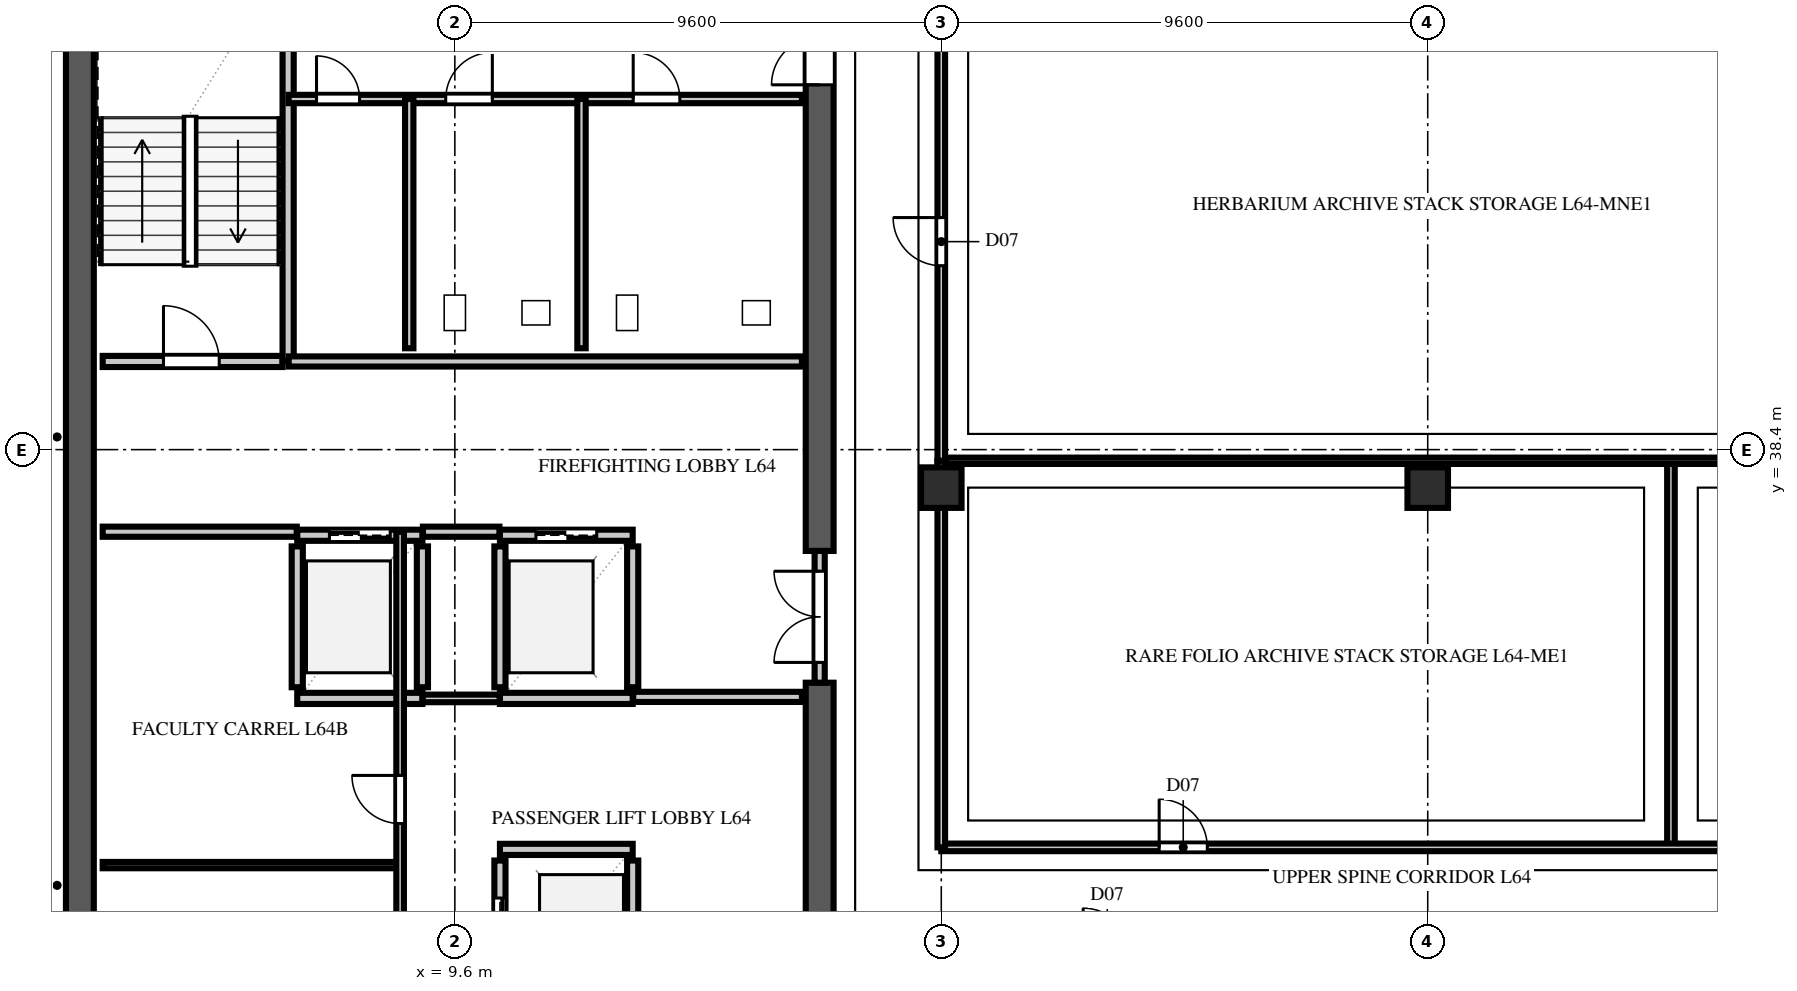
"""IFC4 building model, lengths in metres.
Left out: names, types, materials, properties, quantities, classifications, styles, units other than length and angle.
Written with IfcOpenShell. Run it as: python <this file> out.ifc"""

import sys

from ifc_helpers import new_model, si_unit, direction, frame, frame_2d, origin, origin_2d, place, context, subcontext, project, spatial, rectangle, extrude, element, fill, save


model = new_model("IFC4")
c1 = context("Model", 3, precision=1e-05, world=origin(), true_north=direction((0.0, 1.0)))
c2 = subcontext(c1, "Body", "Model", "MODEL_VIEW")
j1 = project(units=[si_unit("LENGTHUNIT", "METRE"), si_unit("PLANEANGLEUNIT", "RADIAN")], contexts=[c1])
p1 = place(None, origin())
s1 = spatial("IfcSite", under=j1, at=p1, CompositionType="ELEMENT")
p2 = place(p1, origin())
s2 = spatial("IfcBuilding", under=s1, at=p2, CompositionType="ELEMENT")
p3 = place(p2, frame((0.0, 0.0, 252.2)))
s3 = spatial("IfcBuildingStorey", under=s2, at=p3, CompositionType="ELEMENT", Elevation=252.2)
p4 = place(p3, frame((2.2, 9.325, 0.0), z_axis=(0.0, 0.0, 1.0), x_axis=(0.0, 1.0, 0.0)))
e1 = element("IfcWall", 1, at=p4, inside=s3, PredefinedType="SHEAR", context=c2, shape_type="SweptSolid", body=[
    extrude(rectangle(XDim=38.95, YDim=0.55, at=frame_2d((19.475, 0.0))), origin(), (0.0, 0.0, 1.0), 3.48),
])
p5 = place(p3, frame((16.8, 26.0, 0.0), z_axis=(0.0, 0.0, 1.0), x_axis=(0.0, 1.0, 0.0)))
e2 = element("IfcWall", 2, at=p5, inside=s3, PredefinedType="SHEAR", context=c2, shape_type="SweptSolid", body=[
    extrude(rectangle(XDim=7.8, YDim=0.55, at=frame_2d((3.9, 0.0))), origin(), (0.0, 0.0, 1.0), 3.48),
])
p6 = place(p3, frame((16.8, 36.4, 0.0), z_axis=(0.0, 0.0, 1.0), x_axis=(0.0, 1.0, 0.0)))
e3 = element("IfcWall", 3, at=p6, inside=s3, PredefinedType="SHEAR", context=c2, shape_type="SweptSolid", body=[
    extrude(rectangle(XDim=11.325, YDim=0.55, at=frame_2d((5.663, 0.0))), origin(), (0.0, 0.0, 1.0), 3.48),
])
p7 = place(p6, frame((9.2, 0.0, 0.0)))
e4 = element("IfcOpeningElement", 4, at=p7, cuts=e3, PredefinedType="OPENING", context=c2, shape_type="SweptSolid", body=[
    extrude(rectangle(XDim=0.95, YDim=2.15, at=frame_2d((0.475, 1.075))), frame((0.0, 0.287, 0.0), z_axis=(0.0, -1.0, 0.0), x_axis=(1.0, 0.0, 0.0)), (0.0, 0.0, 1.0), 0.574),
])
for number, where, z_axis, x_axis in (
    (5, (19.2, 37.65, 0.0), (0.0, 0.0, 1.0), (1.0, 0.0, 0.0)),
    (6, (28.8, 37.65, 0.0), (0.0, 0.0, 1.0), (1.0, 0.0, 0.0)),
):
    element("IfcColumn", number, at=place(p3, frame(where, z_axis=z_axis, x_axis=x_axis)), inside=s3, PredefinedType="COLUMN", context=c2, shape_type="SweptSolid", body=[
        extrude(rectangle(XDim=0.8, YDim=0.8, at=origin_2d()), origin(), (0.0, 0.0, 1.0), 3.8),
    ])
p8 = place(p3, frame((2.65, 40.14, 0.0), z_axis=(0.0, 0.0, 1.0), x_axis=(1.0, 0.0, 0.0)))
e7 = element("IfcWall", 7, at=p8, inside=s3, PredefinedType="SOLIDWALL", context=c2, shape_type="SweptSolid", body=[
    extrude(rectangle(XDim=3.55, YDim=0.22, at=frame_2d((1.775, 0.0))), origin(), (0.0, 0.0, 1.0), 3.48),
])
p9 = place(p8, frame((1.2, 0.0, 0.0)))
e8 = element("IfcOpeningElement", 8, at=p9, cuts=e7, PredefinedType="OPENING", context=c2, shape_type="SweptSolid", body=[
    extrude(rectangle(XDim=1.1, YDim=2.2, at=frame_2d((0.55, 1.1))), frame((0.0, 0.122, 0.0), z_axis=(0.0, -1.0, 0.0), x_axis=(1.0, 0.0, 0.0)), (0.0, 0.0, 1.0), 0.244),
])
p10 = place(p3, frame((6.31, 40.14, 0.0), z_axis=(0.0, 0.0, 1.0), x_axis=(0.0, 1.0, 0.0)))
e9 = element("IfcWall", 9, at=p10, inside=s3, PredefinedType="SOLIDWALL", context=c2, shape_type="SweptSolid", body=[
    extrude(rectangle(XDim=7.81, YDim=0.22, at=frame_2d((3.905, 0.0))), origin(), (0.0, 0.0, 1.0), 3.48),
])
p11 = place(p3, frame((10.49, 27.71, 0.0), z_axis=(0.0, 0.0, 1.0), x_axis=(0.0, 1.0, 0.0)))
e10 = element("IfcWall", 10, at=p11, inside=s3, PredefinedType="SOLIDWALL", context=c2, shape_type="SweptSolid", body=[
    extrude(rectangle(XDim=2.58, YDim=0.22, at=frame_2d((1.29, 0.0))), origin(), (0.0, 0.0, 1.0), 3.48),
])
p12 = place(p11, frame((0.74, 0.0, 0.0)))
e11 = element("IfcOpeningElement", 11, at=p12, cuts=e10, PredefinedType="OPENING", context=c2, shape_type="SweptSolid", body=[
    extrude(rectangle(XDim=1.1, YDim=2.2, at=frame_2d((0.55, 1.1))), frame((0.0, 0.122, 0.0), z_axis=(0.0, -1.0, 0.0), x_axis=(1.0, 0.0, 0.0)), (0.0, 0.0, 1.0), 0.244),
])
p13 = place(p3, frame((13.11, 27.71, 0.0), z_axis=(0.0, 0.0, 1.0), x_axis=(0.0, 1.0, 0.0)))
e12 = element("IfcWall", 12, at=p13, inside=s3, PredefinedType="SOLIDWALL", context=c2, shape_type="SweptSolid", body=[
    extrude(rectangle(XDim=2.58, YDim=0.22, at=frame_2d((1.29, 0.0))), origin(), (0.0, 0.0, 1.0), 3.48),
])
p14 = place(p3, frame((10.49, 30.51, 0.0), z_axis=(0.0, 0.0, 1.0), x_axis=(1.0, 0.0, 0.0)))
e13 = element("IfcWall", 13, at=p14, inside=s3, PredefinedType="SOLIDWALL", context=c2, shape_type="SweptSolid", body=[
    extrude(rectangle(XDim=2.62, YDim=0.22, at=frame_2d((1.31, 0.0))), origin(), (0.0, 0.0, 1.0), 3.48),
])
for number, where, z_axis, x_axis in (
    (14, (6.49, 33.71, 0.0), (0.0, 0.0, 1.0), (0.0, 1.0, 0.0)),
    (15, (8.96, 33.71, 0.0), (0.0, 0.0, 1.0), (0.0, 1.0, 0.0)),
):
    element("IfcWall", number, at=place(p3, frame(where, z_axis=z_axis, x_axis=x_axis)), inside=s3, PredefinedType="SOLIDWALL", context=c2, shape_type="SweptSolid", body=[
        extrude(rectangle(XDim=2.78, YDim=0.22, at=frame_2d((1.39, 0.0))), origin(), (0.0, 0.0, 1.0), 3.48),
    ])
p15 = place(p3, frame((6.49, 33.49, 0.0), z_axis=(0.0, 0.0, 1.0), x_axis=(1.0, 0.0, 0.0)))
e16 = element("IfcWall", 16, at=p15, inside=s3, PredefinedType="SOLIDWALL", context=c2, shape_type="SweptSolid", body=[
    extrude(rectangle(XDim=2.47, YDim=0.22, at=frame_2d((1.235, 0.0))), origin(), (0.0, 0.0, 1.0), 3.48),
])
p16 = place(p3, frame((6.49, 36.71, 0.0), z_axis=(0.0, 0.0, 1.0), x_axis=(1.0, 0.0, 0.0)))
e17 = element("IfcWall", 17, at=p16, inside=s3, PredefinedType="SOLIDWALL", context=c2, shape_type="SweptSolid", body=[
    extrude(rectangle(XDim=2.47, YDim=0.22, at=frame_2d((1.235, 0.0))), origin(), (0.0, 0.0, 1.0), 3.48),
])
p17 = place(p16, frame((0.635, 0.0, 0.0)))
e18 = element("IfcOpeningElement", 18, at=p17, cuts=e17, PredefinedType="OPENING", context=c2, shape_type="SweptSolid", body=[
    extrude(rectangle(XDim=1.2, YDim=2.2, at=frame_2d((0.6, 1.1))), frame((0.0, 0.122, 0.0), z_axis=(0.0, -1.0, 0.0), x_axis=(1.0, 0.0, 0.0)), (0.0, 0.0, 1.0), 0.244),
])
for number, where, z_axis, x_axis in (
    (19, (10.49, 33.71, 0.0), (0.0, 0.0, 1.0), (0.0, 1.0, 0.0)),
    (20, (13.11, 33.71, 0.0), (0.0, 0.0, 1.0), (0.0, 1.0, 0.0)),
):
    element("IfcWall", number, at=place(p3, frame(where, z_axis=z_axis, x_axis=x_axis)), inside=s3, PredefinedType="SOLIDWALL", context=c2, shape_type="SweptSolid", body=[
        extrude(rectangle(XDim=2.78, YDim=0.22, at=frame_2d((1.39, 0.0))), origin(), (0.0, 0.0, 1.0), 3.48),
    ])
p18 = place(p3, frame((10.49, 33.49, 0.0), z_axis=(0.0, 0.0, 1.0), x_axis=(1.0, 0.0, 0.0)))
e21 = element("IfcWall", 21, at=p18, inside=s3, PredefinedType="SOLIDWALL", context=c2, shape_type="SweptSolid", body=[
    extrude(rectangle(XDim=2.62, YDim=0.22, at=frame_2d((1.31, 0.0))), origin(), (0.0, 0.0, 1.0), 3.48),
])
p19 = place(p3, frame((10.49, 36.71, 0.0), z_axis=(0.0, 0.0, 1.0), x_axis=(1.0, 0.0, 0.0)))
e22 = element("IfcWall", 22, at=p19, inside=s3, PredefinedType="SOLIDWALL", context=c2, shape_type="SweptSolid", body=[
    extrude(rectangle(XDim=2.62, YDim=0.22, at=frame_2d((1.31, 0.0))), origin(), (0.0, 0.0, 1.0), 3.48),
])
p20 = place(p19, frame((0.71, 0.0, 0.0)))
e23 = element("IfcOpeningElement", 23, at=p20, cuts=e22, PredefinedType="OPENING", context=c2, shape_type="SweptSolid", body=[
    extrude(rectangle(XDim=1.2, YDim=2.2, at=frame_2d((0.6, 1.1))), frame((0.0, 0.122, 0.0), z_axis=(0.0, -1.0, 0.0), x_axis=(1.0, 0.0, 0.0)), (0.0, 0.0, 1.0), 0.244),
])
p21 = place(p3, frame((2.65, 36.78, 0.0), z_axis=(0.0, 0.0, 1.0), x_axis=(1.0, 0.0, 0.0)))
e24 = element("IfcWall", 24, at=p21, inside=s3, PredefinedType="SOLIDWALL", context=c2, shape_type="SweptSolid", body=[
    extrude(rectangle(XDim=3.83, YDim=0.2, at=frame_2d((1.915, 0.0))), origin(), (0.0, 0.0, 1.0), 3.48),
])
p22 = place(p3, frame((8.97, 36.78, 0.0), z_axis=(0.0, 0.0, 1.0), x_axis=(1.0, 0.0, 0.0)))
e25 = element("IfcWall", 25, at=p22, inside=s3, PredefinedType="SOLIDWALL", context=c2, shape_type="SweptSolid", body=[
    extrude(rectangle(XDim=1.51, YDim=0.2, at=frame_2d((0.755, 0.0))), origin(), (0.0, 0.0, 1.0), 3.48),
])
p23 = place(p3, frame((13.12, 33.52, 0.0), z_axis=(0.0, 0.0, 1.0), x_axis=(1.0, 0.0, 0.0)))
e26 = element("IfcWall", 26, at=p23, inside=s3, PredefinedType="SOLIDWALL", context=c2, shape_type="SweptSolid", body=[
    extrude(rectangle(XDim=3.33, YDim=0.2, at=frame_2d((1.665, 0.0))), origin(), (0.0, 0.0, 1.0), 3.48),
])
p24 = place(p3, frame((6.32, 40.14, 0.0), z_axis=(0.0, 0.0, 1.0), x_axis=(1.0, 0.0, 0.0)))
e27 = element("IfcWall", 27, at=p24, inside=s3, PredefinedType="SOLIDWALL", context=c2, shape_type="SweptSolid", body=[
    extrude(rectangle(XDim=10.13, YDim=0.2, at=frame_2d((5.065, 0.0))), origin(), (0.0, 0.0, 1.0), 3.48),
])
p25 = place(p3, frame((16.8, 33.8, 0.0), z_axis=(0.0, 0.0, 1.0), x_axis=(0.0, 1.0, 0.0)))
e28 = element("IfcWall", 28, at=p25, inside=s3, PredefinedType="SOLIDWALL", context=c2, shape_type="SweptSolid", body=[
    extrude(rectangle(XDim=2.6, YDim=0.2, at=frame_2d((1.3, 0.0))), origin(), (0.0, 0.0, 1.0), 3.48),
])
p26 = place(p25, frame((0.4, 0.0, 0.0)))
e29 = element("IfcOpeningElement", 29, at=p26, cuts=e28, PredefinedType="OPENING", context=c2, shape_type="SweptSolid", body=[
    extrude(rectangle(XDim=1.8, YDim=2.2, at=frame_2d((0.9, 1.1))), frame((0.0, 0.112, 0.0), z_axis=(0.0, -1.0, 0.0), x_axis=(1.0, 0.0, 0.0)), (0.0, 0.0, 1.0), 0.224),
])
p27 = place(p3, frame((8.965, 33.49, 0.0), z_axis=(0.0, 0.0, 1.0), x_axis=(1.0, 0.0, 0.0)))
e30 = element("IfcWall", 30, at=p27, inside=s3, PredefinedType="PARTITIONING", context=c2, shape_type="SweptSolid", body=[
    extrude(rectangle(XDim=1.52, YDim=0.15, at=frame_2d((0.76, 0.0))), origin(), (0.0, 0.0, 1.0), 3.48),
])
p28 = place(p3, frame((2.65, 30.2, 0.0), z_axis=(0.0, 0.0, 1.0), x_axis=(1.0, 0.0, 0.0)))
e31 = element("IfcWall", 31, at=p28, inside=s3, PredefinedType="PARTITIONING", context=c2, shape_type="SweptSolid", body=[
    extrude(rectangle(XDim=5.87, YDim=0.125, at=frame_2d((2.935, 0.0))), origin(), (0.0, 0.0, 1.0), 3.48),
])
p29 = place(p3, frame((8.52, 12.02, 0.0), z_axis=(0.0, 0.0, 1.0), x_axis=(0.0, 1.0, 0.0)))
e32 = element("IfcWall", 32, at=p29, inside=s3, PredefinedType="PARTITIONING", context=c2, shape_type="SweptSolid", body=[
    extrude(rectangle(XDim=24.76, YDim=0.15, at=frame_2d((12.38, 0.0))), origin(), (0.0, 0.0, 1.0), 3.48),
])
p30 = place(p29, frame((8.0, 0.0, 0.0)))
e33 = element("IfcOpeningElement", 33, at=p30, cuts=e32, PredefinedType="OPENING", context=c2, shape_type="SweptSolid", body=[
    extrude(rectangle(XDim=0.95, YDim=2.15, at=frame_2d((0.475, 1.075))), frame((0.0, 0.087, 0.0), z_axis=(0.0, -1.0, 0.0), x_axis=(1.0, 0.0, 0.0)), (0.0, 0.0, 1.0), 0.174),
])
p31 = place(p29, frame((19.0, 0.0, 0.0)))
e34 = element("IfcOpeningElement", 34, at=p31, cuts=e32, PredefinedType="OPENING", context=c2, shape_type="SweptSolid", body=[
    extrude(rectangle(XDim=0.95, YDim=2.15, at=frame_2d((0.475, 1.075))), frame((0.0, 0.087, 0.0), z_axis=(0.0, -1.0, 0.0), x_axis=(1.0, 0.0, 0.0)), (0.0, 0.0, 1.0), 0.174),
])
p32 = place(p3, frame((6.32, 45.32, 0.0), z_axis=(0.0, 0.0, 1.0), x_axis=(1.0, 0.0, 0.0)))
e35 = element("IfcWall", 35, at=p32, inside=s3, PredefinedType="PLUMBINGWALL", context=c2, shape_type="SweptSolid", body=[
    extrude(rectangle(XDim=10.13, YDim=0.165, at=frame_2d((5.065, 0.0))), origin(), (0.0, 0.0, 1.0), 3.48),
])
p33 = place(p32, frame((0.55, 0.0, 0.0)))
e36 = element("IfcOpeningElement", 36, at=p33, cuts=e35, PredefinedType="OPENING", context=c2, shape_type="SweptSolid", body=[
    extrude(rectangle(XDim=0.85, YDim=2.1, at=frame_2d((0.425, 1.05))), frame((0.0, 0.094, 0.0), z_axis=(0.0, -1.0, 0.0), x_axis=(1.0, 0.0, 0.0)), (0.0, 0.0, 1.0), 0.189),
])
p34 = place(p32, frame((3.1, 0.0, 0.0)))
e37 = element("IfcOpeningElement", 37, at=p34, cuts=e35, PredefinedType="OPENING", context=c2, shape_type="SweptSolid", body=[
    extrude(rectangle(XDim=0.92, YDim=2.15, at=frame_2d((0.46, 1.075))), frame((0.0, 0.094, 0.0), z_axis=(0.0, -1.0, 0.0), x_axis=(1.0, 0.0, 0.0)), (0.0, 0.0, 1.0), 0.189),
])
p35 = place(p32, frame((6.8, 0.0, 0.0)))
e38 = element("IfcOpeningElement", 38, at=p35, cuts=e35, PredefinedType="OPENING", context=c2, shape_type="SweptSolid", body=[
    extrude(rectangle(XDim=0.92, YDim=2.15, at=frame_2d((0.46, 1.075))), frame((0.0, 0.094, 0.0), z_axis=(0.0, -1.0, 0.0), x_axis=(1.0, 0.0, 0.0)), (0.0, 0.0, 1.0), 0.189),
])
for number, where, z_axis, x_axis in (
    (39, (8.7, 40.4, 0.0), (0.0, 0.0, 1.0), (0.0, 1.0, 0.0)),
    (40, (12.1, 40.4, 0.0), (0.0, 0.0, 1.0), (0.0, 1.0, 0.0)),
):
    element("IfcWall", number, at=place(p3, frame(where, z_axis=z_axis, x_axis=x_axis)), inside=s3, PredefinedType="PLUMBINGWALL", context=c2, shape_type="SweptSolid", body=[
        extrude(rectangle(XDim=4.92, YDim=0.165, at=frame_2d((2.46, 0.0))), origin(), (0.0, 0.0, 1.0), 3.48),
    ])
p36 = place(p3, frame((33.6, 30.55, 0.0), z_axis=(0.0, 0.0, 1.0), x_axis=(0.0, 1.0, 0.0)))
e41 = element("IfcWall", 41, at=p36, inside=s3, PredefinedType="PARTITIONING", context=c2, shape_type="SweptSolid", body=[
    extrude(rectangle(XDim=7.63, YDim=0.15, at=frame_2d((3.815, 0.0))), origin(), (0.0, 0.0, 1.0), 3.48),
])
p37 = place(p3, frame((19.2, 30.55, 0.0), z_axis=(0.0, 0.0, 1.0), x_axis=(1.0, 0.0, 0.0)))
e42 = element("IfcWall", 42, at=p37, inside=s3, PredefinedType="PARTITIONING", context=c2, shape_type="SweptSolid", body=[
    extrude(rectangle(XDim=38.18, YDim=0.15, at=frame_2d((19.09, 0.0))), origin(), (0.0, 0.0, 1.0), 3.48),
])
p38 = place(p37, frame((4.3, 0.0, 0.0)))
e43 = element("IfcOpeningElement", 43, at=p38, cuts=e42, PredefinedType="OPENING", context=c2, shape_type="SweptSolid", body=[
    extrude(rectangle(XDim=0.95, YDim=2.15, at=frame_2d((0.475, 1.075))), frame((0.0, 0.087, 0.0), z_axis=(0.0, -1.0, 0.0), x_axis=(1.0, 0.0, 0.0)), (0.0, 0.0, 1.0), 0.174),
])
p39 = place(p37, frame((22.7, 0.0, 0.0)))
e44 = element("IfcOpeningElement", 44, at=p39, cuts=e42, PredefinedType="OPENING", context=c2, shape_type="SweptSolid", body=[
    extrude(rectangle(XDim=0.95, YDim=2.15, at=frame_2d((0.475, 1.075))), frame((0.0, 0.087, 0.0), z_axis=(0.0, -1.0, 0.0), x_axis=(1.0, 0.0, 0.0)), (0.0, 0.0, 1.0), 0.174),
])
p40 = place(p3, frame((19.2, 30.55, 0.0), z_axis=(0.0, 0.0, 1.0), x_axis=(0.0, 1.0, 0.0)))
e45 = element("IfcWall", 45, at=p40, inside=s3, PredefinedType="PARTITIONING", context=c2, shape_type="SweptSolid", body=[
    extrude(rectangle(XDim=7.63, YDim=0.15, at=frame_2d((3.815, 0.0))), origin(), (0.0, 0.0, 1.0), 2.863),
])
p41 = place(p3, frame((19.28, 38.18, 0.0), z_axis=(0.0, 0.0, 1.0), x_axis=(1.0, 0.0, 0.0)))
e46 = element("IfcWall", 46, at=p41, inside=s3, PredefinedType="PARTITIONING", context=c2, shape_type="SweptSolid", body=[
    extrude(rectangle(XDim=18.37, YDim=0.125, at=frame_2d((9.185, 0.0))), origin(), (0.0, 0.0, 1.0), 3.48),
])
p42 = place(p3, frame((19.2, 38.18, 0.0), z_axis=(0.0, 0.0, 1.0), x_axis=(0.0, 1.0, 0.0)))
e47 = element("IfcWall", 47, at=p42, inside=s3, PredefinedType="PARTITIONING", context=c2, shape_type="SweptSolid", body=[
    extrude(rectangle(XDim=10.07, YDim=0.15, at=frame_2d((5.035, 0.0))), origin(), (0.0, 0.0, 1.0), 2.863),
])
p43 = place(p42, frame((3.85, 0.0, 0.0)))
e48 = element("IfcOpeningElement", 48, at=p43, cuts=e47, PredefinedType="OPENING", context=c2, shape_type="SweptSolid", body=[
    extrude(rectangle(XDim=0.95, YDim=2.15, at=frame_2d((0.475, 1.075))), frame((0.0, 0.087, 0.0), z_axis=(0.0, -1.0, 0.0), x_axis=(1.0, 0.0, 0.0)), (0.0, 0.0, 1.0), 0.174),
])
p44 = place(p9, origin())
e49 = element("IfcDoor", 49, at=p44, inside=s3, OperationType="SINGLE_SWING_LEFT", PredefinedType="DOOR", context=c2, shape_type="SweptSolid", body=[
    extrude(rectangle(XDim=1.1, YDim=2.2, at=frame_2d((0.55, 1.1))), frame((0.0, 0.025, 0.0), z_axis=(0.0, -1.0, 0.0), x_axis=(1.0, 0.0, 0.0)), (0.0, 0.0, 1.0), 0.05),
])
fill(e8, e49)
p45 = place(p12, origin())
e50 = element("IfcDoor", 50, at=p45, inside=s3, OperationType="DOUBLE_DOOR_SLIDING", PredefinedType="DOOR", context=c2, shape_type="SweptSolid", body=[
    extrude(rectangle(XDim=1.1, YDim=2.2, at=frame_2d((0.55, 1.1))), frame((0.0, 0.025, 0.0), z_axis=(0.0, -1.0, 0.0), x_axis=(1.0, 0.0, 0.0)), (0.0, 0.0, 1.0), 0.05),
])
fill(e11, e50)
p46 = place(p17, origin())
e51 = element("IfcDoor", 51, at=p46, inside=s3, OperationType="DOUBLE_DOOR_SLIDING", PredefinedType="DOOR", context=c2, shape_type="SweptSolid", body=[
    extrude(rectangle(XDim=1.2, YDim=2.2, at=frame_2d((0.6, 1.1))), frame((0.0, 0.025, 0.0), z_axis=(0.0, -1.0, 0.0), x_axis=(1.0, 0.0, 0.0)), (0.0, 0.0, 1.0), 0.05),
])
fill(e18, e51)
p47 = place(p20, origin())
e52 = element("IfcDoor", 52, at=p47, inside=s3, OperationType="DOUBLE_DOOR_SLIDING", PredefinedType="DOOR", context=c2, shape_type="SweptSolid", body=[
    extrude(rectangle(XDim=1.2, YDim=2.2, at=frame_2d((0.6, 1.1))), frame((0.0, 0.025, 0.0), z_axis=(0.0, -1.0, 0.0), x_axis=(1.0, 0.0, 0.0)), (0.0, 0.0, 1.0), 0.05),
])
fill(e23, e52)
p48 = place(p7, origin())
e53 = element("IfcDoor", 53, at=p48, inside=s3, OperationType="SINGLE_SWING_LEFT", PredefinedType="DOOR", context=c2, shape_type="SweptSolid", body=[
    extrude(rectangle(XDim=0.95, YDim=2.15, at=frame_2d((0.475, 1.075))), frame((0.0, 0.025, 0.0), z_axis=(0.0, -1.0, 0.0), x_axis=(1.0, 0.0, 0.0)), (0.0, 0.0, 1.0), 0.05),
])
fill(e4, e53)
p49 = place(p26, origin())
e54 = element("IfcDoor", 54, at=p49, inside=s3, OperationType="DOUBLE_DOOR_SINGLE_SWING", PredefinedType="DOOR", context=c2, shape_type="SweptSolid", body=[
    extrude(rectangle(XDim=1.8, YDim=2.2, at=frame_2d((0.9, 1.1))), frame((0.0, 0.025, 0.0), z_axis=(0.0, -1.0, 0.0), x_axis=(1.0, 0.0, 0.0)), (0.0, 0.0, 1.0), 0.05),
])
fill(e29, e54)
p50 = place(p31, origin())
e55 = element("IfcDoor", 55, at=p50, inside=s3, OperationType="SINGLE_SWING_RIGHT", PredefinedType="DOOR", context=c2, shape_type="SweptSolid", body=[
    extrude(rectangle(XDim=0.95, YDim=2.15, at=frame_2d((0.475, 1.075))), frame((0.0, 0.025, 0.0), z_axis=(0.0, -1.0, 0.0), x_axis=(1.0, 0.0, 0.0)), (0.0, 0.0, 1.0), 0.05),
])
fill(e34, e55)
p51 = place(p33, origin())
e56 = element("IfcDoor", 56, at=p51, inside=s3, OperationType="SINGLE_SWING_LEFT", PredefinedType="DOOR", context=c2, shape_type="SweptSolid", body=[
    extrude(rectangle(XDim=0.85, YDim=2.1, at=frame_2d((0.425, 1.05))), frame((0.0, 0.025, 0.0), z_axis=(0.0, -1.0, 0.0), x_axis=(1.0, 0.0, 0.0)), (0.0, 0.0, 1.0), 0.05),
])
fill(e36, e56)
p52 = place(p34, origin())
e57 = element("IfcDoor", 57, at=p52, inside=s3, OperationType="SINGLE_SWING_RIGHT", PredefinedType="DOOR", context=c2, shape_type="SweptSolid", body=[
    extrude(rectangle(XDim=0.92, YDim=2.15, at=frame_2d((0.46, 1.075))), frame((0.0, 0.025, 0.0), z_axis=(0.0, -1.0, 0.0), x_axis=(1.0, 0.0, 0.0)), (0.0, 0.0, 1.0), 0.05),
])
fill(e37, e57)
p53 = place(p35, origin())
e58 = element("IfcDoor", 58, at=p53, inside=s3, OperationType="SINGLE_SWING_LEFT", PredefinedType="DOOR", context=c2, shape_type="SweptSolid", body=[
    extrude(rectangle(XDim=0.92, YDim=2.15, at=frame_2d((0.46, 1.075))), frame((0.0, 0.025, 0.0), z_axis=(0.0, -1.0, 0.0), x_axis=(1.0, 0.0, 0.0)), (0.0, 0.0, 1.0), 0.05),
])
fill(e38, e58)
p54 = place(p38, origin())
e59 = element("IfcDoor", 59, at=p54, inside=s3, OperationType="SINGLE_SWING_LEFT", PredefinedType="DOOR", context=c2, shape_type="SweptSolid", body=[
    extrude(rectangle(XDim=0.95, YDim=2.15, at=frame_2d((0.475, 1.075))), frame((0.0, 0.025, 0.0), z_axis=(0.0, -1.0, 0.0), x_axis=(1.0, 0.0, 0.0)), (0.0, 0.0, 1.0), 0.05),
])
fill(e43, e59)
p55 = place(p43, origin())
e60 = element("IfcDoor", 60, at=p55, inside=s3, OperationType="SINGLE_SWING_RIGHT", PredefinedType="DOOR", context=c2, shape_type="SweptSolid", body=[
    extrude(rectangle(XDim=0.95, YDim=2.15, at=frame_2d((0.475, 1.075))), frame((0.0, 0.025, 0.0), z_axis=(0.0, -1.0, 0.0), x_axis=(1.0, 0.0, 0.0)), (0.0, 0.0, 1.0), 0.05),
])
fill(e48, e60)
save(model, sys.argv[1])
